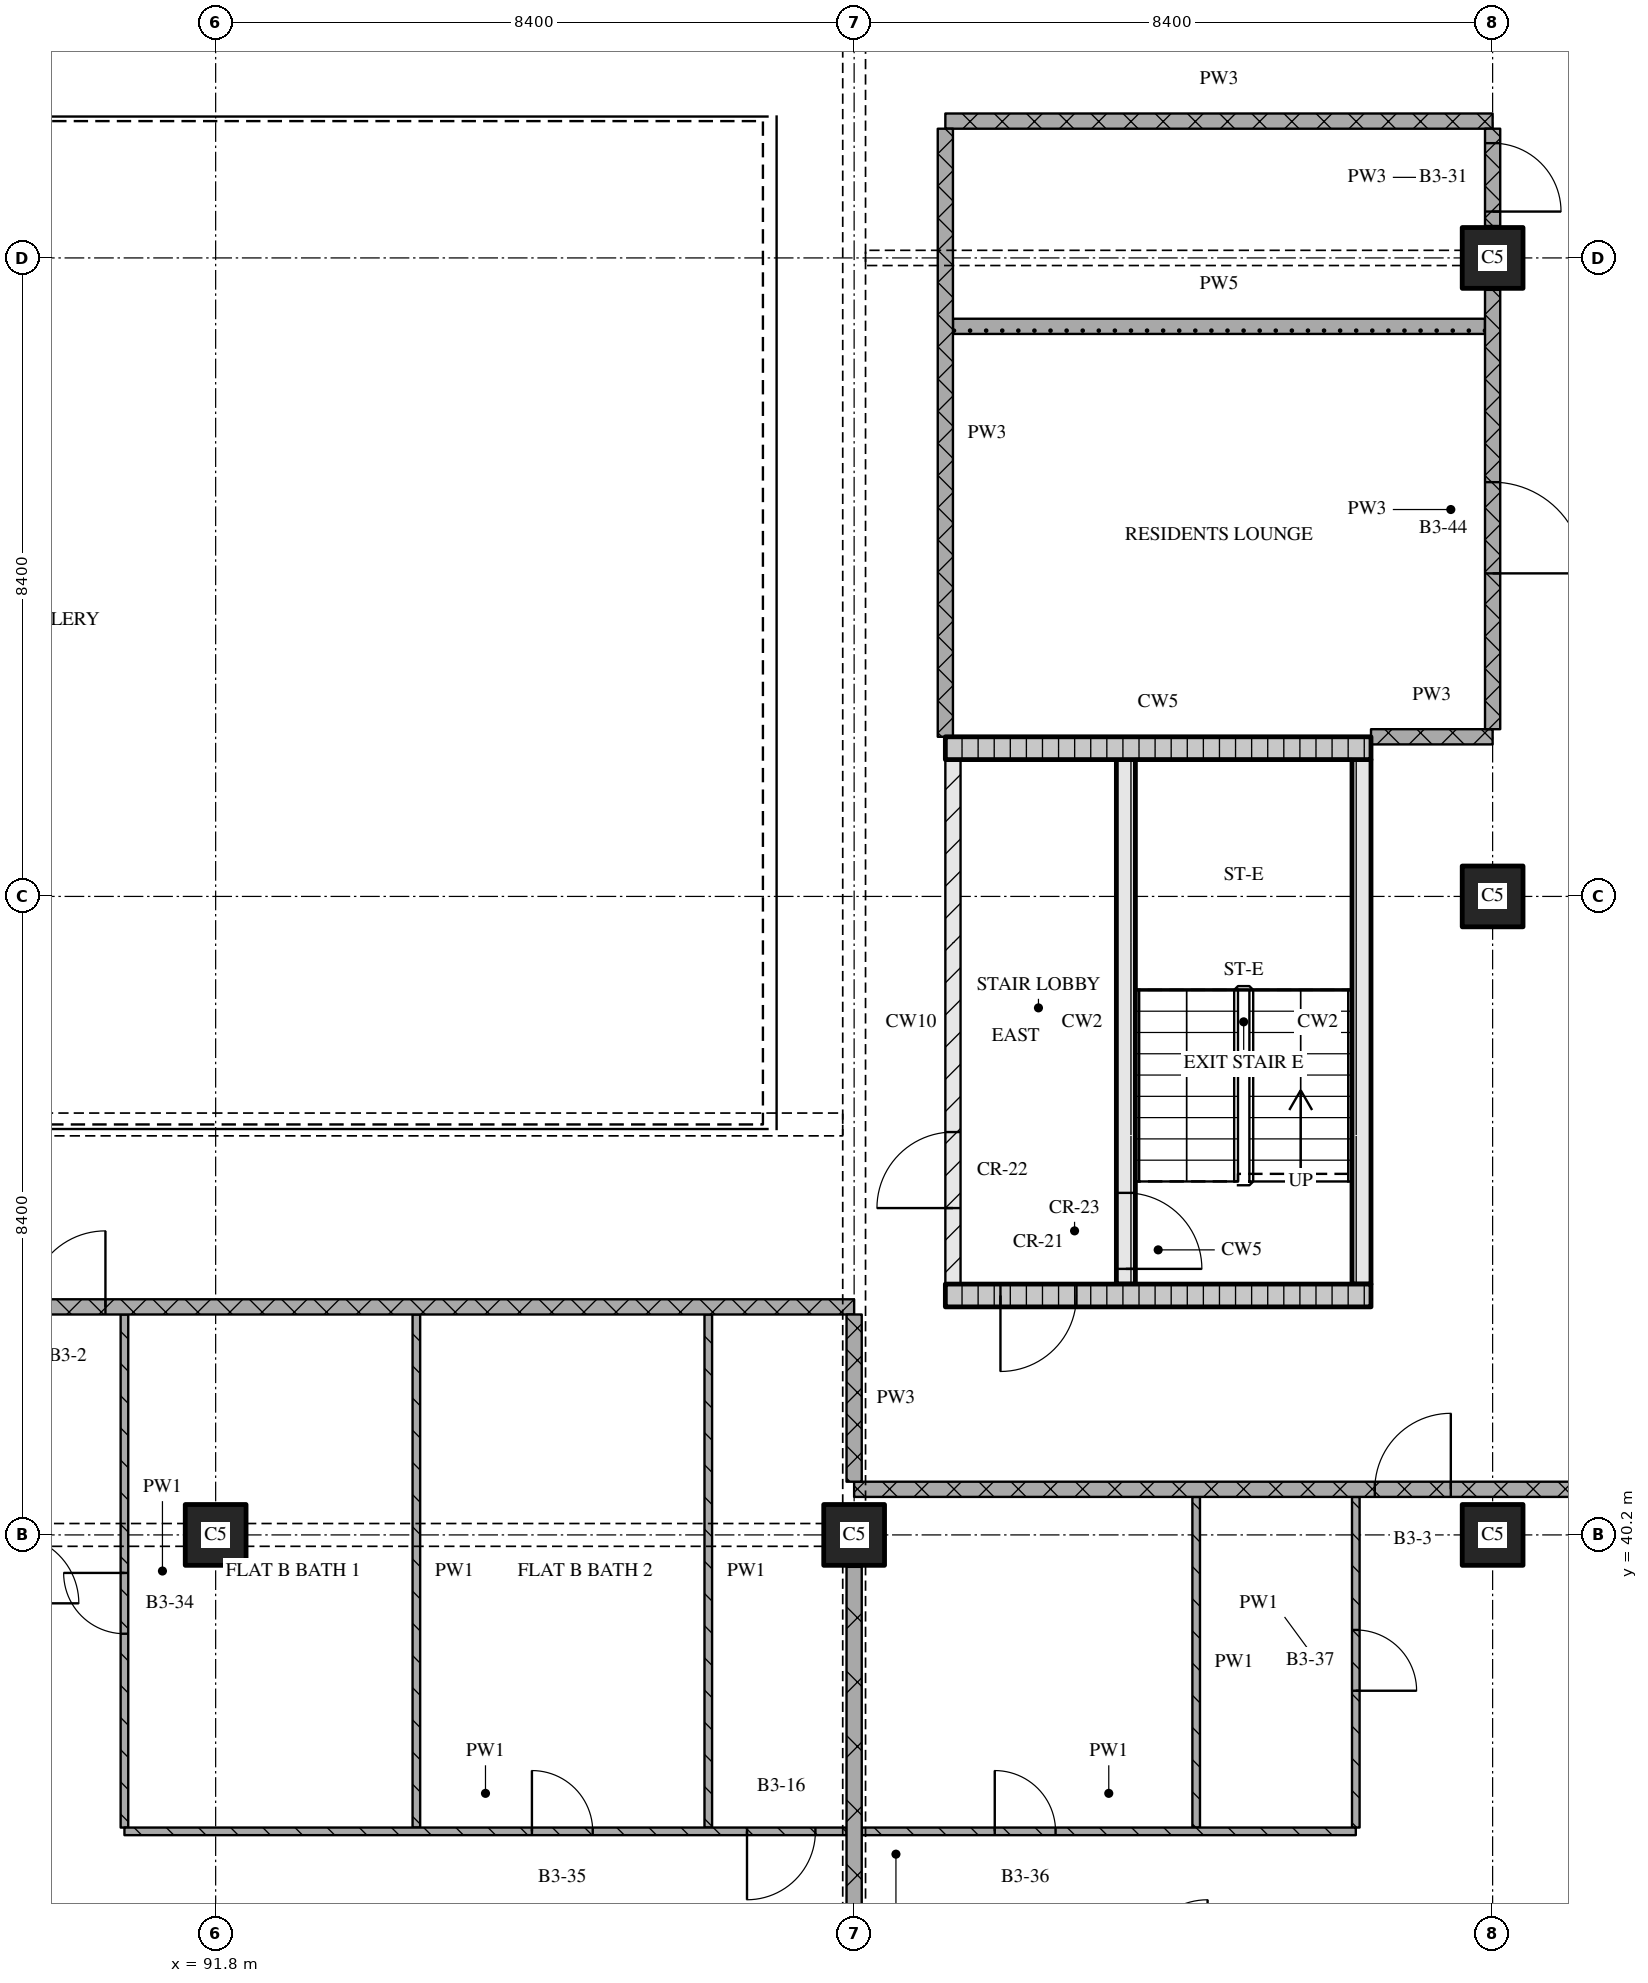
"""IFC4 building model, lengths in metres.
Left out: names, types, materials, properties, quantities, classifications, styles, units other than length and angle.
Written with IfcOpenShell. Run it as: python <this file> out.ifc"""

import sys

from ifc_helpers import new_model, si_unit, direction, frame, frame_2d, origin, origin_2d, place, context, subcontext, project, spatial, rectangle, extrude, element, fill, save


model = new_model("IFC4")
c1 = context("Model", 3, precision=1e-05, world=origin(), true_north=direction((0.0, 1.0)))
c2 = subcontext(c1, "Body", "Model", "MODEL_VIEW")
j1 = project(units=[si_unit("LENGTHUNIT", "METRE"), si_unit("PLANEANGLEUNIT", "RADIAN")], contexts=[c1])
p1 = place(None, origin())
s1 = spatial("IfcSite", under=j1, at=p1, CompositionType="ELEMENT")
p2 = place(p1, origin())
s2 = spatial("IfcBuilding", under=s1, at=p2, CompositionType="ELEMENT")
p3 = place(p2, frame((0.0, 0.0, 124.05)))
s3 = spatial("IfcBuildingStorey", under=s2, at=p3, CompositionType="ELEMENT", Elevation=124.05)
for number, where, z_axis, x_axis in (
    (1, (91.8, 40.2, 0.0), (0.0, 0.0, 1.0), (1.0, 0.0, 0.0)),
    (2, (100.2, 40.2, 0.0), (0.0, 0.0, 1.0), (1.0, 0.0, 0.0)),
    (3, (108.6, 40.2, 0.0), (0.0, 0.0, 1.0), (1.0, 0.0, 0.0)),
    (4, (108.6, 48.6, 0.0), (0.0, 0.0, 1.0), (1.0, 0.0, 0.0)),
    (5, (108.6, 57.0, 0.0), (0.0, 0.0, 1.0), (1.0, 0.0, 0.0)),
):
    element("IfcColumn", number, at=place(p3, frame(where, z_axis=z_axis, x_axis=x_axis)), inside=s3, PredefinedType="COLUMN", context=c2, shape_type="SweptSolid", body=[
        extrude(rectangle(XDim=0.8, YDim=0.8, at=origin_2d()), origin(), (0.0, 0.0, 1.0), 3.6),
    ])
p4 = place(p3, frame((101.4, 43.35, 0.0), z_axis=(0.0, 0.0, 1.0), x_axis=(1.0, 0.0, 0.0)))
e6 = element("IfcWall", 6, at=p4, inside=s3, PredefinedType="SOLIDWALL", context=c2, shape_type="SweptSolid", body=[
    extrude(rectangle(XDim=5.6, YDim=0.3, at=frame_2d((2.8, 0.0))), origin(), (0.0, 0.0, 1.0), 3.32),
])
p5 = place(p4, frame((0.725, 0.0, 0.0)))
e7 = element("IfcOpeningElement", 7, at=p5, cuts=e6, PredefinedType="OPENING", context=c2, shape_type="SweptSolid", body=[
    extrude(rectangle(XDim=1.0, YDim=2.1, at=frame_2d((0.5, 1.05))), frame((0.0, 0.16, 0.0), z_axis=(0.0, -1.0, 0.0), x_axis=(1.0, 0.0, 0.0)), (0.0, 0.0, 1.0), 0.32),
])
p6 = place(p3, frame((101.5, 43.5, 0.0), z_axis=(0.0, 0.0, 1.0), x_axis=(0.0, 1.0, 0.0)))
e8 = element("IfcWall", 8, at=p6, inside=s3, PredefinedType="PARTITIONING", context=c2, shape_type="SweptSolid", body=[
    extrude(rectangle(XDim=6.9, YDim=0.2, at=frame_2d((3.45, 0.0))), origin(), (0.0, 0.0, 1.0), 3.32),
])
p7 = place(p6, frame((1.0, 0.0, 0.0)))
e9 = element("IfcOpeningElement", 9, at=p7, cuts=e8, PredefinedType="OPENING", context=c2, shape_type="SweptSolid", body=[
    extrude(rectangle(XDim=1.0, YDim=2.1, at=frame_2d((0.5, 1.05))), frame((0.0, 0.11, 0.0), z_axis=(0.0, -1.0, 0.0), x_axis=(1.0, 0.0, 0.0)), (0.0, 0.0, 1.0), 0.22),
])
p8 = place(p3, frame((103.775, 43.5, 0.0), z_axis=(0.0, 0.0, 1.0), x_axis=(0.0, 1.0, 0.0)))
e10 = element("IfcWall", 10, at=p8, inside=s3, PredefinedType="SOLIDWALL", context=c2, shape_type="SweptSolid", body=[
    extrude(rectangle(XDim=6.9, YDim=0.25, at=frame_2d((3.45, 0.0))), origin(), (0.0, 0.0, 1.0), 3.32),
])
p9 = place(p8, frame((0.2, 0.0, 0.0)))
e11 = element("IfcOpeningElement", 11, at=p9, cuts=e10, PredefinedType="OPENING", context=c2, shape_type="SweptSolid", body=[
    extrude(rectangle(XDim=1.0, YDim=2.1, at=frame_2d((0.5, 1.05))), frame((0.0, 0.135, 0.0), z_axis=(0.0, -1.0, 0.0), x_axis=(1.0, 0.0, 0.0)), (0.0, 0.0, 1.0), 0.27),
])
p10 = place(p3, frame((106.875, 43.5, 0.0), z_axis=(0.0, 0.0, 1.0), x_axis=(0.0, 1.0, 0.0)))
e12 = element("IfcWall", 12, at=p10, inside=s3, PredefinedType="SOLIDWALL", context=c2, shape_type="SweptSolid", body=[
    extrude(rectangle(XDim=6.9, YDim=0.25, at=frame_2d((3.45, 0.0))), origin(), (0.0, 0.0, 1.0), 3.32),
])
p11 = place(p3, frame((101.4, 50.55, 0.0), z_axis=(0.0, 0.0, 1.0), x_axis=(1.0, 0.0, 0.0)))
e13 = element("IfcWall", 13, at=p11, inside=s3, PredefinedType="SOLIDWALL", context=c2, shape_type="SweptSolid", body=[
    extrude(rectangle(XDim=5.6, YDim=0.3, at=frame_2d((2.8, 0.0))), origin(), (0.0, 0.0, 1.0), 3.32),
])
p12 = place(p3, frame((124.38, 40.8, 0.0), z_axis=(0.0, 0.0, 1.0), x_axis=(-1.0, 0.0, 0.0)))
e14 = element("IfcWall", 14, at=p12, inside=s3, PredefinedType="PARTITIONING", context=c2, shape_type="SweptSolid", body=[
    extrude(rectangle(XDim=24.18, YDim=0.2, at=frame_2d((12.09, 0.0))), origin(), (0.0, 0.0, 1.0), 3.32),
])
p13 = place(p12, frame((16.33, 0.0, 0.0)))
e15 = element("IfcOpeningElement", 15, at=p13, cuts=e14, PredefinedType="OPENING", context=c2, shape_type="SweptSolid", body=[
    extrude(rectangle(XDim=1.0, YDim=2.1, at=frame_2d((0.5, 1.05))), frame((0.0, 0.11, 0.0), z_axis=(0.0, -1.0, 0.0), x_axis=(1.0, 0.0, 0.0)), (0.0, 0.0, 1.0), 0.22),
])
p14 = place(p3, frame((100.2, 43.2, 0.0), z_axis=(0.0, 0.0, 1.0), x_axis=(-1.0, 0.0, 0.0)))
e16 = element("IfcWall", 16, at=p14, inside=s3, PredefinedType="PARTITIONING", context=c2, shape_type="SweptSolid", body=[
    extrude(rectangle(XDim=25.2, YDim=0.2, at=frame_2d((12.6, 0.0))), origin(), (0.0, 0.0, 1.0), 3.32),
])
p15 = place(p14, frame((9.85, 0.0, 0.0)))
e17 = element("IfcOpeningElement", 17, at=p15, cuts=e16, PredefinedType="OPENING", context=c2, shape_type="SweptSolid", body=[
    extrude(rectangle(XDim=1.0, YDim=2.1, at=frame_2d((0.5, 1.05))), frame((0.0, 0.11, 0.0), z_axis=(0.0, -1.0, 0.0), x_axis=(1.0, 0.0, 0.0)), (0.0, 0.0, 1.0), 0.22),
])
p16 = place(p3, frame((107.0, 50.7, 0.0), z_axis=(0.0, 0.0, 1.0), x_axis=(1.0, 0.0, 0.0)))
e18 = element("IfcWall", 18, at=p16, inside=s3, PredefinedType="PARTITIONING", context=c2, shape_type="SweptSolid", body=[
    extrude(rectangle(XDim=1.6, YDim=0.2, at=frame_2d((0.8, 0.0))), origin(), (0.0, 0.0, 1.0), 3.32),
])
p17 = place(p3, frame((101.5, 56.1, 0.0), z_axis=(0.0, 0.0, 1.0), x_axis=(1.0, 0.0, 0.0)))
e19 = element("IfcWall", 19, at=p17, inside=s3, PredefinedType="PARTITIONING", context=c2, shape_type="SweptSolid", body=[
    extrude(rectangle(XDim=7.0, YDim=0.2, at=frame_2d((3.5, 0.0))), origin(), (0.0, 0.0, 1.0), 3.32),
])
p18 = place(p3, frame((101.4, 58.8, 0.0), z_axis=(0.0, 0.0, 1.0), x_axis=(1.0, 0.0, 0.0)))
e20 = element("IfcWall", 20, at=p18, inside=s3, PredefinedType="PARTITIONING", context=c2, shape_type="SweptSolid", body=[
    extrude(rectangle(XDim=7.2, YDim=0.2, at=frame_2d((3.6, 0.0))), origin(), (0.0, 0.0, 1.0), 3.32),
])
p19 = place(p3, frame((90.6, 43.1, 0.0), z_axis=(0.0, 0.0, 1.0), x_axis=(0.0, -1.0, 0.0)))
e21 = element("IfcWall", 21, at=p19, inside=s3, PredefinedType="PARTITIONING", context=c2, shape_type="SweptSolid", body=[
    extrude(rectangle(XDim=6.75, YDim=0.1, at=frame_2d((3.375, 0.0))), origin(), (0.0, 0.0, 1.0), 3.32),
])
p20 = place(p19, frame((3.4, 0.0, 0.0)))
e22 = element("IfcOpeningElement", 22, at=p20, cuts=e21, PredefinedType="OPENING", context=c2, shape_type="SweptSolid", body=[
    extrude(rectangle(XDim=0.8, YDim=2.1, at=frame_2d((0.4, 1.05))), frame((0.0, 0.06, 0.0), z_axis=(0.0, -1.0, 0.0), x_axis=(1.0, 0.0, 0.0)), (0.0, 0.0, 1.0), 0.12),
])
for number, where, z_axis, x_axis in (
    (23, (94.441, 43.1, 0.0), (0.0, 0.0, 1.0), (0.0, -1.0, 0.0)),
    (24, (98.281, 43.1, 0.0), (0.0, 0.0, 1.0), (0.0, -1.0, 0.0)),
):
    element("IfcWall", number, at=place(p3, frame(where, z_axis=z_axis, x_axis=x_axis)), inside=s3, PredefinedType="PARTITIONING", context=c2, shape_type="SweptSolid", body=[
        extrude(rectangle(XDim=6.75, YDim=0.1, at=frame_2d((3.375, 0.0))), origin(), (0.0, 0.0, 1.0), 3.32),
    ])
p21 = place(p3, frame((100.2, 43.1, 0.0), z_axis=(0.0, 0.0, 1.0), x_axis=(0.0, -1.0, 0.0)))
e25 = element("IfcWall", 25, at=p21, inside=s3, PredefinedType="PARTITIONING", context=c2, shape_type="SweptSolid", body=[
    extrude(rectangle(XDim=2.2, YDim=0.2, at=frame_2d((1.1, 0.0))), origin(), (0.0, 0.0, 1.0), 2.43),
])
p22 = place(p3, frame((100.2, 39.78, 0.0), z_axis=(0.0, 0.0, 1.0), x_axis=(0.0, -1.0, 0.0)))
e26 = element("IfcWall", 26, at=p22, inside=s3, PredefinedType="PARTITIONING", context=c2, shape_type="SweptSolid", body=[
    extrude(rectangle(XDim=7.56, YDim=0.2, at=frame_2d((3.78, 0.0))), origin(), (0.0, 0.0, 1.0), 2.83),
])
p23 = place(p3, frame((101.4, 58.7, 0.0), z_axis=(0.0, 0.0, 1.0), x_axis=(0.0, -1.0, 0.0)))
e27 = element("IfcWall", 27, at=p23, inside=s3, PredefinedType="PARTITIONING", context=c2, shape_type="SweptSolid", body=[
    extrude(rectangle(XDim=8.0, YDim=0.2, at=frame_2d((4.0, 0.0))), origin(), (0.0, 0.0, 1.0), 3.32),
])
p24 = place(p3, frame((104.7, 40.7, 0.0), z_axis=(0.0, 0.0, 1.0), x_axis=(0.0, -1.0, 0.0)))
e28 = element("IfcWall", 28, at=p24, inside=s3, PredefinedType="PARTITIONING", context=c2, shape_type="SweptSolid", body=[
    extrude(rectangle(XDim=4.35, YDim=0.1, at=frame_2d((2.175, 0.0))), origin(), (0.0, 0.0, 1.0), 3.32),
])
p25 = place(p3, frame((106.8, 36.35, 0.0), z_axis=(0.0, 0.0, 1.0), x_axis=(0.0, 1.0, 0.0)))
e29 = element("IfcWall", 29, at=p25, inside=s3, PredefinedType="PARTITIONING", context=c2, shape_type="SweptSolid", body=[
    extrude(rectangle(XDim=4.35, YDim=0.1, at=frame_2d((2.175, 0.0))), origin(), (0.0, 0.0, 1.0), 3.32),
])
p26 = place(p25, frame((1.8, 0.0, 0.0)))
e30 = element("IfcOpeningElement", 30, at=p26, cuts=e29, PredefinedType="OPENING", context=c2, shape_type="SweptSolid", body=[
    extrude(rectangle(XDim=0.8, YDim=2.1, at=frame_2d((0.4, 1.05))), frame((0.0, 0.06, 0.0), z_axis=(0.0, -1.0, 0.0), x_axis=(1.0, 0.0, 0.0)), (0.0, 0.0, 1.0), 0.12),
])
p27 = place(p3, frame((108.6, 50.8, 0.0), z_axis=(0.0, 0.0, 1.0), x_axis=(0.0, 1.0, 0.0)))
e31 = element("IfcWall", 31, at=p27, inside=s3, PredefinedType="PARTITIONING", context=c2, shape_type="SweptSolid", body=[
    extrude(rectangle(XDim=5.78, YDim=0.2, at=frame_2d((2.89, 0.0))), origin(), (0.0, 0.0, 1.0), 3.32),
])
p28 = place(p27, frame((2.05, 0.0, 0.0)))
e32 = element("IfcOpeningElement", 32, at=p28, cuts=e31, PredefinedType="OPENING", context=c2, shape_type="SweptSolid", body=[
    extrude(rectangle(XDim=1.2, YDim=2.1, at=frame_2d((0.6, 1.05))), frame((0.0, 0.11, 0.0), z_axis=(0.0, -1.0, 0.0), x_axis=(1.0, 0.0, 0.0)), (0.0, 0.0, 1.0), 0.22),
])
p29 = place(p3, frame((108.6, 57.42, 0.0), z_axis=(0.0, 0.0, 1.0), x_axis=(0.0, 1.0, 0.0)))
e33 = element("IfcWall", 33, at=p29, inside=s3, PredefinedType="PARTITIONING", context=c2, shape_type="SweptSolid", body=[
    extrude(rectangle(XDim=1.28, YDim=0.2, at=frame_2d((0.64, 0.0))), origin(), (0.0, 0.0, 1.0), 3.32),
])
p30 = place(p29, frame((0.19, 0.0, 0.0)))
e34 = element("IfcOpeningElement", 34, at=p30, cuts=e33, PredefinedType="OPENING", context=c2, shape_type="SweptSolid", body=[
    extrude(rectangle(XDim=0.9, YDim=2.1, at=frame_2d((0.45, 1.05))), frame((0.0, 0.11, 0.0), z_axis=(0.0, -1.0, 0.0), x_axis=(1.0, 0.0, 0.0)), (0.0, 0.0, 1.0), 0.22),
])
p31 = place(p3, frame((90.6, 36.3, 0.0), z_axis=(0.0, 0.0, 1.0), x_axis=(1.0, 0.0, 0.0)))
e35 = element("IfcWall", 35, at=p31, inside=s3, PredefinedType="PARTITIONING", context=c2, shape_type="SweptSolid", body=[
    extrude(rectangle(XDim=9.5, YDim=0.1, at=frame_2d((4.75, 0.0))), origin(), (0.0, 0.0, 1.0), 3.32),
])
p32 = place(p31, frame((5.361, 0.0, 0.0)))
e36 = element("IfcOpeningElement", 36, at=p32, cuts=e35, PredefinedType="OPENING", context=c2, shape_type="SweptSolid", body=[
    extrude(rectangle(XDim=0.8, YDim=2.1, at=frame_2d((0.4, 1.05))), frame((0.0, 0.06, 0.0), z_axis=(0.0, -1.0, 0.0), x_axis=(1.0, 0.0, 0.0)), (0.0, 0.0, 1.0), 0.12),
])
p33 = place(p31, frame((8.191, 0.0, 0.0)))
e37 = element("IfcOpeningElement", 37, at=p33, cuts=e35, PredefinedType="OPENING", context=c2, shape_type="SweptSolid", body=[
    extrude(rectangle(XDim=0.9, YDim=2.1, at=frame_2d((0.45, 1.05))), frame((0.0, 0.06, 0.0), z_axis=(0.0, -1.0, 0.0), x_axis=(1.0, 0.0, 0.0)), (0.0, 0.0, 1.0), 0.12),
])
p34 = place(p3, frame((100.3, 36.3, 0.0), z_axis=(0.0, 0.0, 1.0), x_axis=(1.0, 0.0, 0.0)))
e38 = element("IfcWall", 38, at=p34, inside=s3, PredefinedType="PARTITIONING", context=c2, shape_type="SweptSolid", body=[
    extrude(rectangle(XDim=6.5, YDim=0.1, at=frame_2d((3.25, 0.0))), origin(), (0.0, 0.0, 1.0), 3.32),
])
p35 = place(p34, frame((1.75, 0.0, 0.0)))
e39 = element("IfcOpeningElement", 39, at=p35, cuts=e38, PredefinedType="OPENING", context=c2, shape_type="SweptSolid", body=[
    extrude(rectangle(XDim=0.8, YDim=2.1, at=frame_2d((0.4, 1.05))), frame((0.0, 0.06, 0.0), z_axis=(0.0, -1.0, 0.0), x_axis=(1.0, 0.0, 0.0)), (0.0, 0.0, 1.0), 0.12),
])
p36 = place(p5, origin())
e40 = element("IfcDoor", 40, at=p36, inside=s3, OperationType="SINGLE_SWING_RIGHT", PredefinedType="DOOR", context=c2, shape_type="SweptSolid", body=[
    extrude(rectangle(XDim=1.0, YDim=2.1, at=frame_2d((0.5, 1.05))), frame((0.0, 0.025, 0.0), z_axis=(0.0, -1.0, 0.0), x_axis=(1.0, 0.0, 0.0)), (0.0, 0.0, 1.0), 0.05),
])
fill(e7, e40)
p37 = place(p9, origin())
e41 = element("IfcDoor", 41, at=p37, inside=s3, OperationType="SINGLE_SWING_RIGHT", PredefinedType="DOOR", context=c2, shape_type="SweptSolid", body=[
    extrude(rectangle(XDim=1.0, YDim=2.1, at=frame_2d((0.5, 1.05))), frame((0.0, 0.025, 0.0), z_axis=(0.0, -1.0, 0.0), x_axis=(1.0, 0.0, 0.0)), (0.0, 0.0, 1.0), 0.05),
])
fill(e11, e41)
p38 = place(p7, origin())
e42 = element("IfcDoor", 42, at=p38, inside=s3, OperationType="SINGLE_SWING_LEFT", PredefinedType="DOOR", context=c2, shape_type="SweptSolid", body=[
    extrude(rectangle(XDim=1.0, YDim=2.1, at=frame_2d((0.5, 1.05))), frame((0.0, 0.025, 0.0), z_axis=(0.0, -1.0, 0.0), x_axis=(1.0, 0.0, 0.0)), (0.0, 0.0, 1.0), 0.05),
])
fill(e9, e42)
p39 = place(p13, origin())
e43 = element("IfcDoor", 43, at=p39, inside=s3, OperationType="SINGLE_SWING_RIGHT", PredefinedType="DOOR", context=c2, shape_type="SweptSolid", body=[
    extrude(rectangle(XDim=1.0, YDim=2.1, at=frame_2d((0.5, 1.05))), frame((0.0, 0.025, 0.0), z_axis=(0.0, -1.0, 0.0), x_axis=(1.0, 0.0, 0.0)), (0.0, 0.0, 1.0), 0.05),
])
fill(e15, e43)
p40 = place(p15, origin())
e44 = element("IfcDoor", 44, at=p40, inside=s3, OperationType="SINGLE_SWING_RIGHT", PredefinedType="DOOR", context=c2, shape_type="SweptSolid", body=[
    extrude(rectangle(XDim=1.0, YDim=2.1, at=frame_2d((0.5, 1.05))), frame((0.0, 0.025, 0.0), z_axis=(0.0, -1.0, 0.0), x_axis=(1.0, 0.0, 0.0)), (0.0, 0.0, 1.0), 0.05),
])
fill(e17, e44)
p41 = place(p20, origin())
e45 = element("IfcDoor", 45, at=p41, inside=s3, OperationType="SINGLE_SWING_RIGHT", PredefinedType="DOOR", context=c2, shape_type="SweptSolid", body=[
    extrude(rectangle(XDim=0.8, YDim=2.1, at=frame_2d((0.4, 1.05))), frame((0.0, 0.025, 0.0), z_axis=(0.0, -1.0, 0.0), x_axis=(1.0, 0.0, 0.0)), (0.0, 0.0, 1.0), 0.05),
])
fill(e22, e45)
p42 = place(p26, origin())
e46 = element("IfcDoor", 46, at=p42, inside=s3, OperationType="SINGLE_SWING_RIGHT", PredefinedType="DOOR", context=c2, shape_type="SweptSolid", body=[
    extrude(rectangle(XDim=0.8, YDim=2.1, at=frame_2d((0.4, 1.05))), frame((0.0, 0.025, 0.0), z_axis=(0.0, -1.0, 0.0), x_axis=(1.0, 0.0, 0.0)), (0.0, 0.0, 1.0), 0.05),
])
fill(e30, e46)
p43 = place(p28, origin())
e47 = element("IfcDoor", 47, at=p43, inside=s3, OperationType="SINGLE_SWING_RIGHT", PredefinedType="DOOR", context=c2, shape_type="SweptSolid", body=[
    extrude(rectangle(XDim=1.2, YDim=2.1, at=frame_2d((0.6, 1.05))), frame((0.0, 0.025, 0.0), z_axis=(0.0, -1.0, 0.0), x_axis=(1.0, 0.0, 0.0)), (0.0, 0.0, 1.0), 0.05),
])
fill(e32, e47)
p44 = place(p30, origin())
e48 = element("IfcDoor", 48, at=p44, inside=s3, OperationType="SINGLE_SWING_RIGHT", PredefinedType="DOOR", context=c2, shape_type="SweptSolid", body=[
    extrude(rectangle(XDim=0.9, YDim=2.1, at=frame_2d((0.45, 1.05))), frame((0.0, 0.025, 0.0), z_axis=(0.0, -1.0, 0.0), x_axis=(1.0, 0.0, 0.0)), (0.0, 0.0, 1.0), 0.05),
])
fill(e34, e48)
p45 = place(p32, origin())
e49 = element("IfcDoor", 49, at=p45, inside=s3, OperationType="SINGLE_SWING_LEFT", PredefinedType="DOOR", context=c2, shape_type="SweptSolid", body=[
    extrude(rectangle(XDim=0.8, YDim=2.1, at=frame_2d((0.4, 1.05))), frame((0.0, 0.025, 0.0), z_axis=(0.0, -1.0, 0.0), x_axis=(1.0, 0.0, 0.0)), (0.0, 0.0, 1.0), 0.05),
])
fill(e36, e49)
p46 = place(p33, origin())
e50 = element("IfcDoor", 50, at=p46, inside=s3, OperationType="SINGLE_SWING_RIGHT", PredefinedType="DOOR", context=c2, shape_type="SweptSolid", body=[
    extrude(rectangle(XDim=0.9, YDim=2.1, at=frame_2d((0.45, 1.05))), frame((0.0, 0.025, 0.0), z_axis=(0.0, -1.0, 0.0), x_axis=(1.0, 0.0, 0.0)), (0.0, 0.0, 1.0), 0.05),
])
fill(e37, e50)
p47 = place(p35, origin())
e51 = element("IfcDoor", 51, at=p47, inside=s3, OperationType="SINGLE_SWING_LEFT", PredefinedType="DOOR", context=c2, shape_type="SweptSolid", body=[
    extrude(rectangle(XDim=0.8, YDim=2.1, at=frame_2d((0.4, 1.05))), frame((0.0, 0.025, 0.0), z_axis=(0.0, -1.0, 0.0), x_axis=(1.0, 0.0, 0.0)), (0.0, 0.0, 1.0), 0.05),
])
fill(e39, e51)
save(model, sys.argv[1])
